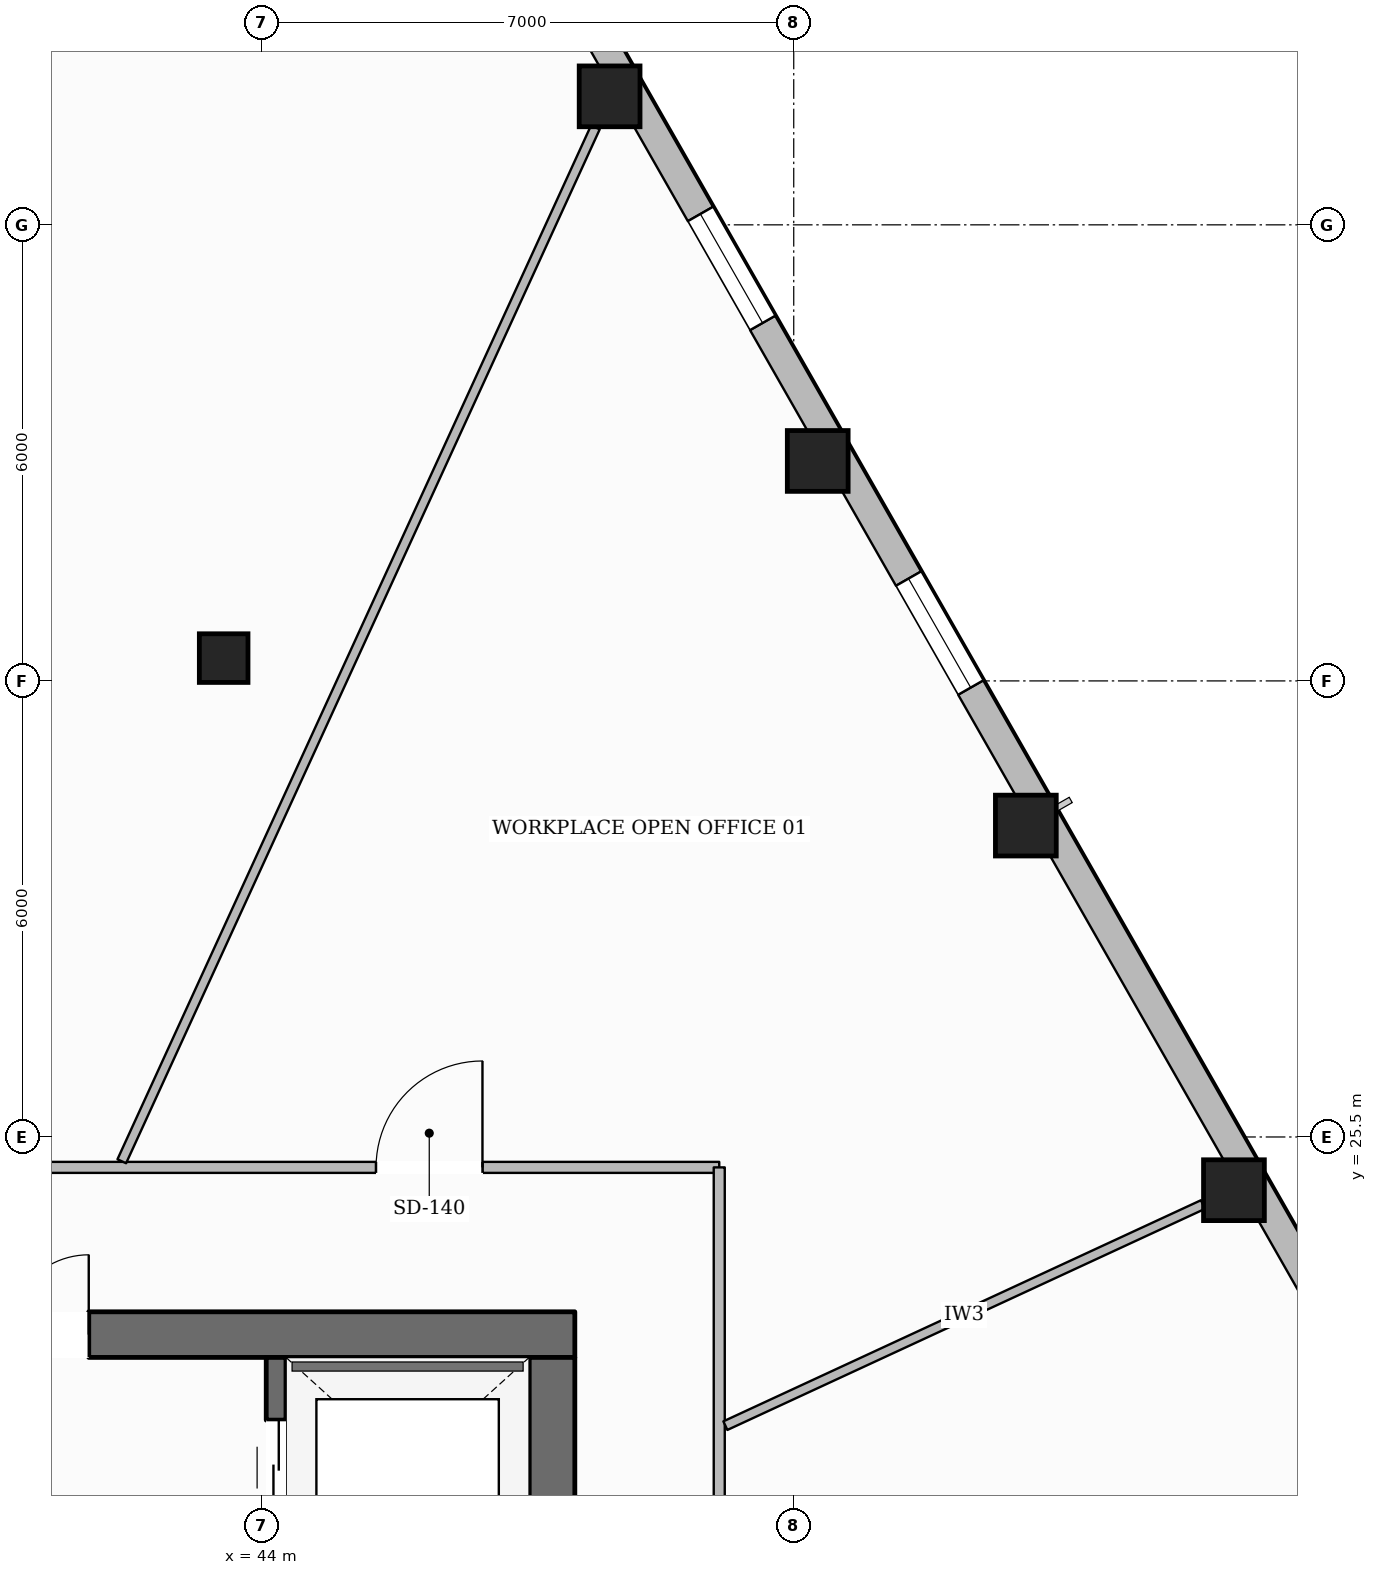
"""IFC4 building model, lengths in metres.
Left out: names, types, materials, properties, quantities, classifications, styles, units other than length and angle.
Written with IfcOpenShell. Run it as: python <this file> out.ifc"""

import sys

from ifc_helpers import new_model, si_unit, direction, frame, frame_2d, origin, origin_2d, place, context, subcontext, project, spatial, rectangle, hollow_rectangle, extrude, element, fill, save


model = new_model("IFC4")
c1 = context("Model", 3, precision=1e-05, world=origin(), true_north=direction((0.0, 1.0)))
c2 = subcontext(c1, "Body", "Model", "MODEL_VIEW")
j1 = project(units=[si_unit("LENGTHUNIT", "METRE"), si_unit("PLANEANGLEUNIT", "RADIAN")], contexts=[c1])
p1 = place(None, origin())
s1 = spatial("IfcSite", under=j1, at=p1, CompositionType="ELEMENT")
p2 = place(p1, origin())
s2 = spatial("IfcBuilding", under=s1, at=p2, CompositionType="ELEMENT")
p3 = place(p2, frame((0.0, 0.0, 25.25)))
s3 = spatial("IfcBuildingStorey", under=s2, at=p3, CompositionType="ELEMENT", Elevation=25.25)
p4 = place(p3, frame((27.88, 22.9, 0.0), z_axis=(0.0, 0.0, 1.0), x_axis=(1.0, 0.0, 0.0)))
e1 = element("IfcWall", 1, at=p4, inside=s3, PredefinedType="SOLIDWALL", context=c2, shape_type="SweptSolid", body=[
    extrude(rectangle(XDim=20.24, YDim=0.6, at=frame_2d((10.12, 0.0))), origin(), (0.0, 0.0, 1.0), 3.59),
])
p5 = place(p4, frame((6.395, 0.0, 0.0)))
e2 = element("IfcOpeningElement", 2, at=p5, cuts=e1, PredefinedType="OPENING", context=c2, shape_type="SweptSolid", body=[
    extrude(rectangle(XDim=1.05, YDim=2.15, at=frame_2d((0.525, 1.075))), frame((0.0, 0.31, 0.0), z_axis=(0.0, -1.0, 0.0), x_axis=(1.0, 0.0, 0.0)), (0.0, 0.0, 1.0), 0.62),
])
p6 = place(p4, frame((12.795, 0.0, 0.0)))
e3 = element("IfcOpeningElement", 3, at=p6, cuts=e1, PredefinedType="OPENING", context=c2, shape_type="SweptSolid", body=[
    extrude(rectangle(XDim=1.05, YDim=2.15, at=frame_2d((0.525, 1.075))), frame((0.0, 0.31, 0.0), z_axis=(0.0, -1.0, 0.0), x_axis=(1.0, 0.0, 0.0)), (0.0, 0.0, 1.0), 0.62),
])
p7 = place(p3, frame((47.82, 9.6, 0.0), z_axis=(0.0, 0.0, 1.0), x_axis=(0.0, 1.0, 0.0)))
e4 = element("IfcWall", 4, at=p7, inside=s3, PredefinedType="SOLIDWALL", context=c2, shape_type="SweptSolid", body=[
    extrude(rectangle(XDim=13.0, YDim=0.6, at=frame_2d((6.5, 0.0))), origin(), (0.0, 0.0, 1.0), 3.59),
])
p8 = place(p7, frame((0.2, 0.0, 0.0)))
e5 = element("IfcOpeningElement", 5, at=p8, cuts=e4, PredefinedType="OPENING", context=c2, shape_type="SweptSolid", body=[
    extrude(rectangle(XDim=1.1, YDim=2.15, at=frame_2d((0.55, 1.075))), frame((0.0, 0.31, 0.0), z_axis=(0.0, -1.0, 0.0), x_axis=(1.0, 0.0, 0.0)), (0.0, 0.0, 1.0), 0.62),
])
p9 = place(p7, frame((8.4, 0.0, 0.0)))
e6 = element("IfcOpeningElement", 6, at=p9, cuts=e4, PredefinedType="OPENING", context=c2, shape_type="SweptSolid", body=[
    extrude(rectangle(XDim=0.9, YDim=2.1, at=frame_2d((0.45, 1.05))), frame((0.0, 0.31, 0.0), z_axis=(0.0, -1.0, 0.0), x_axis=(1.0, 0.0, 0.0)), (0.0, 0.0, 1.0), 0.62),
])
p10 = place(p3, frame((44.19, 9.6, 0.0), z_axis=(0.0, 0.0, 1.0), x_axis=(0.0, 1.0, 0.0)))
e7 = element("IfcWall", 7, at=p10, inside=s3, PredefinedType="SHEAR", context=c2, shape_type="SweptSolid", body=[
    extrude(rectangle(XDim=13.0, YDim=0.26, at=frame_2d((6.5, 0.0))), origin(), (0.0, 0.0, 1.0), 3.59),
])
p11 = place(p10, frame((10.925, 0.0, 0.0)))
e8 = element("IfcOpeningElement", 8, at=p11, cuts=e7, PredefinedType="OPENING", context=c2, shape_type="SweptSolid", body=[
    extrude(rectangle(XDim=1.25, YDim=2.25, at=frame_2d((0.625, 1.125))), frame((0.0, 0.14, 0.0), z_axis=(0.0, -1.0, 0.0), x_axis=(1.0, 0.0, 0.0)), (0.0, 0.0, 1.0), 0.28),
])
for number, where, z_axis, x_axis in (
    (9, (56.792, 24.8, 0.0), (0.0, 0.0, 1.0), (1.0, 0.0, 0.0)),
    (10, (54.054, 29.597, 0.0), (0.0, 0.0, 1.0), (1.0, 0.0, 0.0)),
    (11, (51.316, 34.394, 0.0), (0.0, 0.0, 1.0), (1.0, 0.0, 0.0)),
    (12, (48.578, 39.19, 0.0), (0.0, 0.0, 1.0), (1.0, 0.0, 0.0)),
):
    element("IfcColumn", number, at=place(p3, frame(where, z_axis=z_axis, x_axis=x_axis)), inside=s3, PredefinedType="COLUMN", context=c2, shape_type="SweptSolid", body=[
        extrude(hollow_rectangle(XDim=0.8, YDim=0.8, WallThickness=0.036, at=origin_2d()), origin(), (0.0, 0.0, 1.0), 3.59),
    ])
p12 = place(p3, frame((43.5, 31.8, 0.0), z_axis=(0.0, 0.0, 1.0), x_axis=(1.0, 0.0, 0.0)))
e13 = element("IfcColumn", 13, at=p12, inside=s3, PredefinedType="COLUMN", context=c2, shape_type="SweptSolid", body=[
    extrude(hollow_rectangle(XDim=0.64, YDim=0.64, WallThickness=0.028, at=origin_2d()), origin(), (0.0, 0.0, 1.0), 3.59),
])
p13 = place(p3, frame((45.837, 44.537, 0.0), z_axis=(0.0, 0.0, 1.0), x_axis=(0.495711630902, -0.868487178367, 0.0)))
e14 = element("IfcWall", 14, at=p13, inside=s3, PredefinedType="STANDARD", context=c2, shape_type="SweptSolid", body=[
    extrude(rectangle(XDim=34.092, YDim=0.38, at=frame_2d((17.046, 0.0))), origin(), (0.0, 0.0, 1.0), 2.97),
])
p14 = place(p13, frame((30.031, 0.0, 0.65)))
e15 = element("IfcOpeningElement", 15, at=p14, cuts=e14, PredefinedType="OPENING", context=c2, shape_type="SweptSolid", body=[
    extrude(rectangle(XDim=1.65, YDim=1.75, at=frame_2d((0.825, 0.875))), frame((0.0, 0.2, 0.0), z_axis=(0.0, -1.0, 0.0), x_axis=(1.0, 0.0, 0.0)), (0.0, 0.0, 1.0), 0.4),
])
p15 = place(p13, frame((24.508, 0.0, 0.65)))
e16 = element("IfcOpeningElement", 16, at=p15, cuts=e14, PredefinedType="OPENING", context=c2, shape_type="SweptSolid", body=[
    extrude(rectangle(XDim=1.65, YDim=1.75, at=frame_2d((0.825, 0.875))), frame((0.0, 0.2, 0.0), z_axis=(0.0, -1.0, 0.0), x_axis=(1.0, 0.0, 0.0)), (0.0, 0.0, 1.0), 0.4),
])
p16 = place(p13, frame((13.462, 0.0, 0.65)))
e17 = element("IfcOpeningElement", 17, at=p16, cuts=e14, PredefinedType="OPENING", context=c2, shape_type="SweptSolid", body=[
    extrude(rectangle(XDim=1.65, YDim=1.75, at=frame_2d((0.825, 0.875))), frame((0.0, 0.2, 0.0), z_axis=(0.0, -1.0, 0.0), x_axis=(1.0, 0.0, 0.0)), (0.0, 0.0, 1.0), 0.4),
])
p17 = place(p13, frame((7.939, 0.0, 0.65)))
e18 = element("IfcOpeningElement", 18, at=p17, cuts=e14, PredefinedType="OPENING", context=c2, shape_type="SweptSolid", body=[
    extrude(rectangle(XDim=1.65, YDim=1.75, at=frame_2d((0.825, 0.875))), frame((0.0, 0.2, 0.0), z_axis=(0.0, -1.0, 0.0), x_axis=(1.0, 0.0, 0.0)), (0.0, 0.0, 1.0), 0.4),
])
p18 = place(p13, frame((2.415, 0.0, 0.65)))
e19 = element("IfcOpeningElement", 19, at=p18, cuts=e14, PredefinedType="OPENING", context=c2, shape_type="SweptSolid", body=[
    extrude(rectangle(XDim=1.65, YDim=1.75, at=frame_2d((0.825, 0.875))), frame((0.0, 0.2, 0.0), z_axis=(0.0, -1.0, 0.0), x_axis=(1.0, 0.0, 0.0)), (0.0, 0.0, 1.0), 0.4),
])
p19 = place(p3, frame((39.0, 25.1, 0.0), z_axis=(0.0, 0.0, 1.0), x_axis=(1.0, 0.0, 0.0)))
e20 = element("IfcWall", 20, at=p19, inside=s3, PredefinedType="PARTITIONING", context=c2, shape_type="SweptSolid", body=[
    extrude(rectangle(XDim=11.02, YDim=0.145, at=frame_2d((5.51, 0.0))), origin(), (0.0, 0.0, 1.0), 3.59),
])
p20 = place(p19, frame((6.505, 0.0, 0.0)))
e21 = element("IfcOpeningElement", 21, at=p20, cuts=e20, PredefinedType="OPENING", context=c2, shape_type="SweptSolid", body=[
    extrude(rectangle(XDim=1.4, YDim=2.2, at=frame_2d((0.7, 1.1))), frame((0.0, 0.083, 0.0), z_axis=(0.0, -1.0, 0.0), x_axis=(1.0, 0.0, 0.0)), (0.0, 0.0, 1.0), 0.165),
])
p21 = place(p3, frame((50.02, 25.1, 0.0), z_axis=(0.0, 0.0, 1.0), x_axis=(0.0, -1.0, 0.0)))
e22 = element("IfcWall", 22, at=p21, inside=s3, PredefinedType="PARTITIONING", context=c2, shape_type="SweptSolid", body=[
    extrude(rectangle(XDim=16.0, YDim=0.145, at=frame_2d((8.0, 0.0))), origin(), (0.0, 0.0, 1.0), 3.278),
])
p22 = place(p21, frame((8.916, 0.0, 0.0)))
e23 = element("IfcOpeningElement", 23, at=p22, cuts=e22, PredefinedType="OPENING", context=c2, shape_type="SweptSolid", body=[
    extrude(rectangle(XDim=1.4, YDim=2.2, at=frame_2d((0.7, 1.1))), frame((0.0, 0.083, 0.0), z_axis=(0.0, -1.0, 0.0), x_axis=(1.0, 0.0, 0.0)), (0.0, 0.0, 1.0), 0.165),
])
p23 = place(p3, frame((50.101, 21.702, 0.0), z_axis=(0.0, 0.0, 1.0), x_axis=(0.907458193586, 0.420142388832, 0.0)))
e24 = element("IfcWall", 24, at=p23, inside=s3, PredefinedType="PARTITIONING", context=c2, shape_type="SweptSolid", body=[
    extrude(rectangle(XDim=6.924, YDim=0.125, at=frame_2d((3.462, 0.0))), origin(), (0.0, 0.0, 1.0), 3.057),
])
p24 = place(p3, frame((42.16, 25.18, 0.0), z_axis=(0.0, 0.0, 1.0), x_axis=(0.416471526835, 0.90914875974, 0.0)))
e25 = element("IfcWall", 25, at=p24, inside=s3, PredefinedType="PARTITIONING", context=c2, shape_type="SweptSolid", body=[
    extrude(rectangle(XDim=14.961, YDim=0.125, at=frame_2d((7.481, 0.0))), origin(), (0.0, 0.0, 1.0), 3.057),
])
p25 = place(p16, origin())
e26 = element("IfcWindow", 26, at=p25, inside=s3, PartitioningType="SINGLE_PANEL", PredefinedType="WINDOW", context=c2, shape_type="SweptSolid", body=[
    extrude(rectangle(XDim=1.65, YDim=1.75, at=frame_2d((0.825, 0.875))), frame((0.0, 0.03, 0.0), z_axis=(0.0, -1.0, 0.0), x_axis=(1.0, 0.0, 0.0)), (0.0, 0.0, 1.0), 0.06),
])
fill(e17, e26)
p26 = place(p17, origin())
e27 = element("IfcWindow", 27, at=p26, inside=s3, PartitioningType="SINGLE_PANEL", PredefinedType="WINDOW", context=c2, shape_type="SweptSolid", body=[
    extrude(rectangle(XDim=1.65, YDim=1.75, at=frame_2d((0.825, 0.875))), frame((0.0, 0.03, 0.0), z_axis=(0.0, -1.0, 0.0), x_axis=(1.0, 0.0, 0.0)), (0.0, 0.0, 1.0), 0.06),
])
fill(e18, e27)
p27 = place(p6, origin())
e28 = element("IfcDoor", 28, at=p27, inside=s3, OperationType="SINGLE_SWING_RIGHT", PredefinedType="DOOR", context=c2, shape_type="SweptSolid", body=[
    extrude(rectangle(XDim=1.05, YDim=2.15, at=frame_2d((0.525, 1.075))), frame((0.0, 0.025, 0.0), z_axis=(0.0, -1.0, 0.0), x_axis=(1.0, 0.0, 0.0)), (0.0, 0.0, 1.0), 0.05),
])
fill(e3, e28)
p28 = place(p11, origin())
e29 = element("IfcDoor", 29, at=p28, inside=s3, OperationType="DOUBLE_DOOR_SLIDING", PredefinedType="DOOR", context=c2, shape_type="SweptSolid", body=[
    extrude(rectangle(XDim=1.25, YDim=2.25, at=frame_2d((0.625, 1.125))), frame((0.0, 0.025, 0.0), z_axis=(0.0, -1.0, 0.0), x_axis=(1.0, 0.0, 0.0)), (0.0, 0.0, 1.0), 0.05),
])
fill(e8, e29)
p29 = place(p20, origin())
e30 = element("IfcDoor", 30, at=p29, inside=s3, OperationType="SINGLE_SWING_RIGHT", PredefinedType="DOOR", context=c2, shape_type="SweptSolid", body=[
    extrude(rectangle(XDim=1.4, YDim=2.2, at=frame_2d((0.7, 1.1))), frame((0.0, 0.025, 0.0), z_axis=(0.0, -1.0, 0.0), x_axis=(1.0, 0.0, 0.0)), (0.0, 0.0, 1.0), 0.05),
])
fill(e21, e30)
save(model, sys.argv[1])
